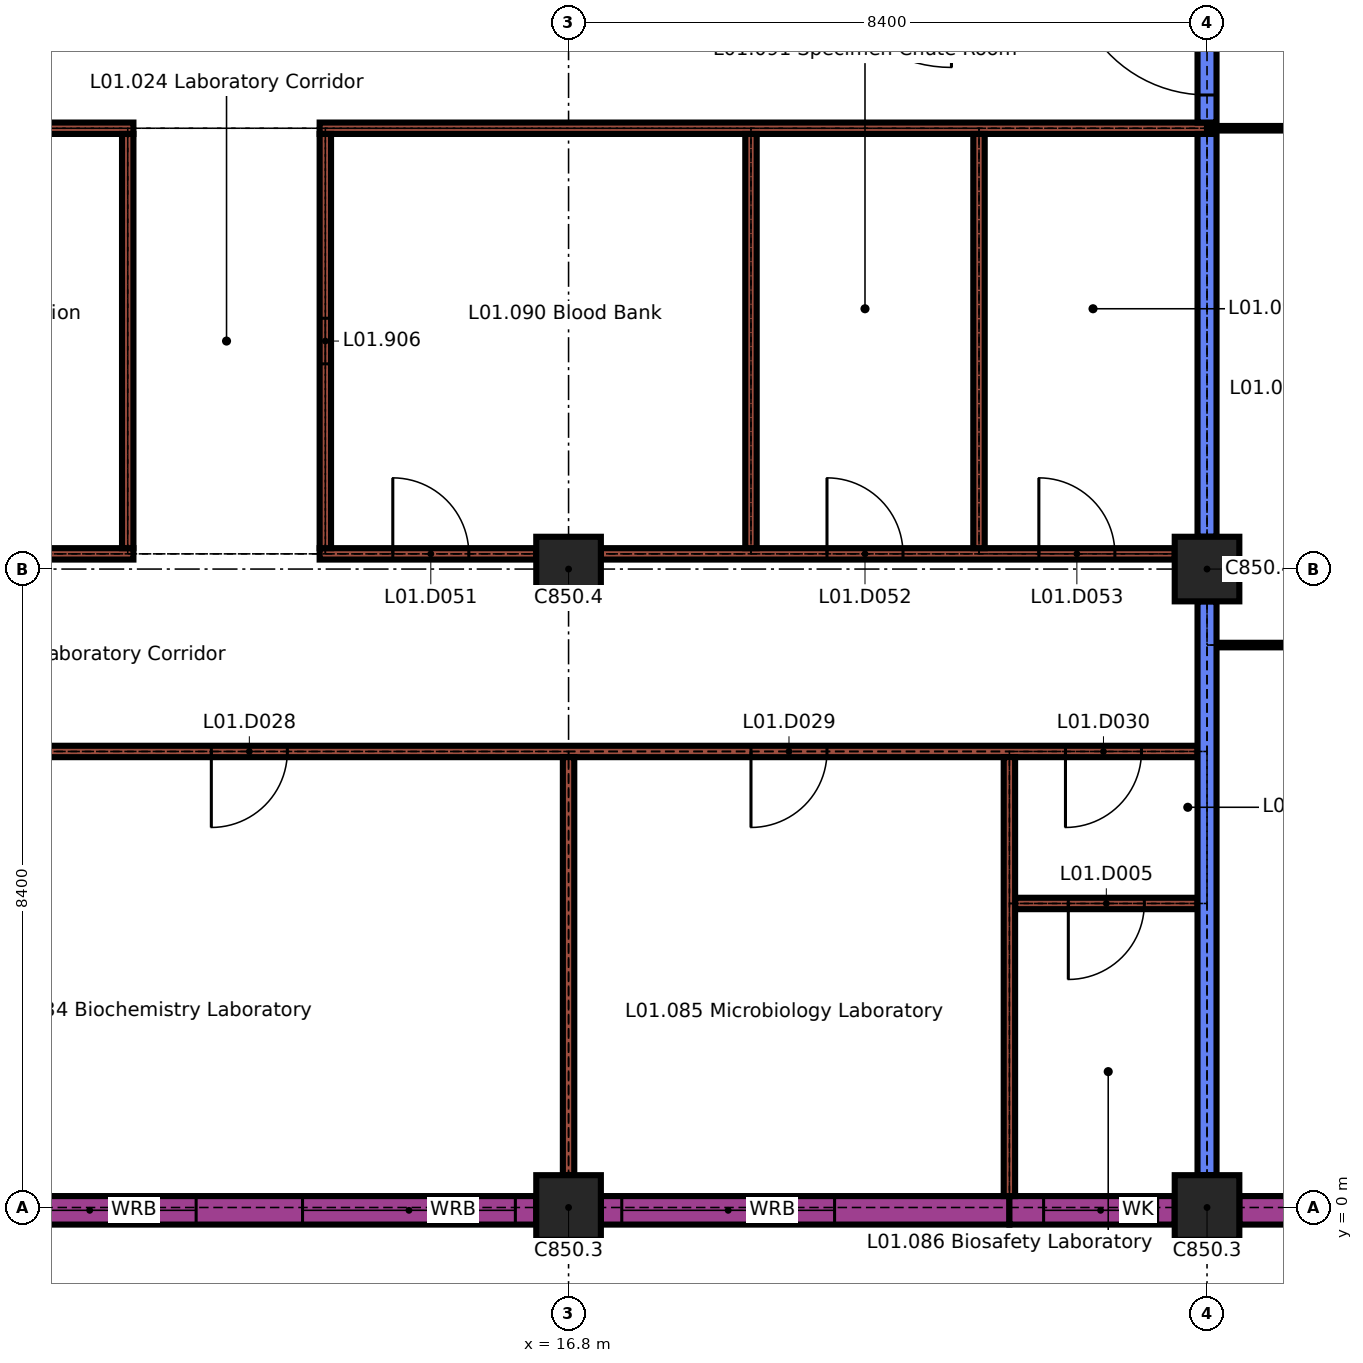
"""IFC4 building model, lengths in metres.
Left out: names, types, materials, properties, quantities, classifications, styles, units other than length and angle.
Written with IfcOpenShell. Run it as: python <this file> out.ifc"""

import sys

from ifc_helpers import new_model, si_unit, direction, frame, frame_2d, origin, origin_2d, place, context, subcontext, project, spatial, rectangle, extrude, element, fill, save


model = new_model("IFC4")
c1 = context("Model", 3, precision=1e-05, world=origin(), true_north=direction((0.0, 1.0)))
c2 = subcontext(c1, "Body", "Model", "MODEL_VIEW")
j1 = project(units=[si_unit("LENGTHUNIT", "METRE"), si_unit("PLANEANGLEUNIT", "RADIAN")], contexts=[c1])
p1 = place(None, origin())
s1 = spatial("IfcSite", under=j1, at=p1, CompositionType="ELEMENT")
p2 = place(p1, origin())
s2 = spatial("IfcBuilding", under=s1, at=p2, CompositionType="ELEMENT")
p3 = place(p2, frame((0.0, 0.0, 4.5)))
s3 = spatial("IfcBuildingStorey", under=s2, at=p3, CompositionType="ELEMENT", Elevation=4.5)
for number, where, z_axis, x_axis in (
    (1, (16.8, 0.0, 0.0), (0.0, 0.0, 1.0), (1.0, 0.0, 0.0)),
    (2, (25.2, 0.0, 0.0), (0.0, 0.0, 1.0), (1.0, 0.0, 0.0)),
    (3, (16.8, 8.4, 0.0), (0.0, 0.0, 1.0), (1.0, 0.0, 0.0)),
    (4, (25.2, 8.4, 0.0), (0.0, 0.0, 1.0), (1.0, 0.0, 0.0)),
):
    element("IfcColumn", number, at=place(p3, frame(where, z_axis=z_axis, x_axis=x_axis)), inside=s3, PredefinedType="COLUMN", context=c2, shape_type="SweptSolid", body=[
        extrude(rectangle(XDim=0.85, YDim=0.85, at=origin_2d()), origin(), (0.0, 0.0, 1.0), 3.45),
    ])
p4 = place(p3, frame((8.825, -0.038, 0.0), z_axis=(0.0, 0.0, 1.0), x_axis=(1.0, 0.0, 0.0)))
e5 = element("IfcWall", 5, at=p4, inside=s3, PredefinedType="SOLIDWALL", context=c2, shape_type="SweptSolid", body=[
    extrude(rectangle(XDim=7.55, YDim=0.375, at=frame_2d((3.775, 0.0))), origin(), (0.0, 0.0, 1.0), 3.15),
])
p5 = place(p4, frame((0.275, 0.0, 1.0)))
e6 = element("IfcOpeningElement", 6, at=p5, cuts=e5, PredefinedType="OPENING", context=c2, shape_type="SweptSolid", body=[
    extrude(rectangle(XDim=2.8, YDim=1.2, at=frame_2d((1.4, 0.6))), frame((0.0, 0.198, 0.0), z_axis=(0.0, -1.0, 0.0), x_axis=(1.0, 0.0, 0.0)), (0.0, 0.0, 1.0), 0.395),
])
p6 = place(p4, frame((4.475, 0.0, 1.0)))
e7 = element("IfcOpeningElement", 7, at=p6, cuts=e5, PredefinedType="OPENING", context=c2, shape_type="SweptSolid", body=[
    extrude(rectangle(XDim=2.8, YDim=1.2, at=frame_2d((1.4, 0.6))), frame((0.0, 0.198, 0.0), z_axis=(0.0, -1.0, 0.0), x_axis=(1.0, 0.0, 0.0)), (0.0, 0.0, 1.0), 0.395),
])
p7 = place(p3, frame((17.225, -0.038, 0.0), z_axis=(0.0, 0.0, 1.0), x_axis=(1.0, 0.0, 0.0)))
e8 = element("IfcWall", 8, at=p7, inside=s3, PredefinedType="SOLIDWALL", context=c2, shape_type="SweptSolid", body=[
    extrude(rectangle(XDim=5.375, YDim=0.375, at=frame_2d((2.688, 0.0))), origin(), (0.0, 0.0, 1.0), 3.15),
])
p8 = place(p7, frame((0.275, 0.0, 1.0)))
e9 = element("IfcOpeningElement", 9, at=p8, cuts=e8, PredefinedType="OPENING", context=c2, shape_type="SweptSolid", body=[
    extrude(rectangle(XDim=2.8, YDim=1.2, at=frame_2d((1.4, 0.6))), frame((0.0, 0.198, 0.0), z_axis=(0.0, -1.0, 0.0), x_axis=(1.0, 0.0, 0.0)), (0.0, 0.0, 1.0), 0.395),
])
p9 = place(p3, frame((22.6, -0.038, 0.0), z_axis=(0.0, 0.0, 1.0), x_axis=(1.0, 0.0, 0.0)))
e10 = element("IfcWall", 10, at=p9, inside=s3, PredefinedType="SOLIDWALL", context=c2, shape_type="SweptSolid", body=[
    extrude(rectangle(XDim=2.175, YDim=0.375, at=frame_2d((1.087, 0.0))), origin(), (0.0, 0.0, 1.0), 3.15),
])
p10 = place(p9, frame((0.45, 0.0, 1.05)))
e11 = element("IfcOpeningElement", 11, at=p10, cuts=e10, PredefinedType="OPENING", context=c2, shape_type="SweptSolid", body=[
    extrude(rectangle(XDim=1.5, YDim=1.2, at=frame_2d((0.75, 0.6))), frame((0.0, 0.198, 0.0), z_axis=(0.0, -1.0, 0.0), x_axis=(1.0, 0.0, 0.0)), (0.0, 0.0, 1.0), 0.395),
])
p11 = place(p3, frame((25.625, -0.038, 0.0), z_axis=(0.0, 0.0, 1.0), x_axis=(1.0, 0.0, 0.0)))
e12 = element("IfcWall", 12, at=p11, inside=s3, PredefinedType="SOLIDWALL", context=c2, shape_type="SweptSolid", body=[
    extrude(rectangle(XDim=7.975, YDim=0.375, at=frame_2d((3.988, 0.0))), origin(), (0.0, 0.0, 1.0), 3.15),
])
p12 = place(p3, frame((22.675, 4.0, 0.0), z_axis=(0.0, 0.0, 1.0), x_axis=(1.0, 0.0, 0.0)))
e13 = element("IfcWall", 13, at=p12, inside=s3, PredefinedType="PARTITIONING", context=c2, shape_type="SweptSolid", body=[
    extrude(rectangle(XDim=2.4, YDim=0.15, at=frame_2d((1.2, 0.0))), origin(), (0.0, 0.0, 1.0), 3.45),
])
p13 = place(p12, frame((0.7, 0.0, 0.0)))
e14 = element("IfcOpeningElement", 14, at=p13, cuts=e13, PredefinedType="OPENING", context=c2, shape_type="SweptSolid", body=[
    extrude(rectangle(XDim=1.0, YDim=2.1, at=frame_2d((0.5, 1.05))), frame((0.0, 0.085, 0.0), z_axis=(0.0, -1.0, 0.0), x_axis=(1.0, 0.0, 0.0)), (0.0, 0.0, 1.0), 0.17),
])
p14 = place(p3, frame((0.15, 6.0, 0.0), z_axis=(0.0, 0.0, 1.0), x_axis=(1.0, 0.0, 0.0)))
e15 = element("IfcWall", 15, at=p14, inside=s3, PredefinedType="PARTITIONING", context=c2, shape_type="SweptSolid", body=[
    extrude(rectangle(XDim=24.925, YDim=0.15, at=frame_2d((12.462, 0.0))), origin(), (0.0, 0.0, 1.0), 3.45),
])
p15 = place(p14, frame((3.625, 0.0, 0.0)))
e16 = element("IfcOpeningElement", 16, at=p15, cuts=e15, PredefinedType="OPENING", context=c2, shape_type="SweptSolid", body=[
    extrude(rectangle(XDim=1.0, YDim=2.1, at=frame_2d((0.5, 1.05))), frame((0.0, 0.085, 0.0), z_axis=(0.0, -1.0, 0.0), x_axis=(1.0, 0.0, 0.0)), (0.0, 0.0, 1.0), 0.17),
])
p16 = place(p14, frame((11.95, 0.0, 0.0)))
e17 = element("IfcOpeningElement", 17, at=p16, cuts=e15, PredefinedType="OPENING", context=c2, shape_type="SweptSolid", body=[
    extrude(rectangle(XDim=1.0, YDim=2.1, at=frame_2d((0.5, 1.05))), frame((0.0, 0.085, 0.0), z_axis=(0.0, -1.0, 0.0), x_axis=(1.0, 0.0, 0.0)), (0.0, 0.0, 1.0), 0.17),
])
p17 = place(p14, frame((19.05, 0.0, 0.0)))
e18 = element("IfcOpeningElement", 18, at=p17, cuts=e15, PredefinedType="OPENING", context=c2, shape_type="SweptSolid", body=[
    extrude(rectangle(XDim=1.0, YDim=2.1, at=frame_2d((0.5, 1.05))), frame((0.0, 0.085, 0.0), z_axis=(0.0, -1.0, 0.0), x_axis=(1.0, 0.0, 0.0)), (0.0, 0.0, 1.0), 0.17),
])
p18 = place(p14, frame((23.188, 0.0, 0.0)))
e19 = element("IfcOpeningElement", 19, at=p18, cuts=e15, PredefinedType="OPENING", context=c2, shape_type="SweptSolid", body=[
    extrude(rectangle(XDim=1.0, YDim=2.1, at=frame_2d((0.5, 1.05))), frame((0.0, 0.085, 0.0), z_axis=(0.0, -1.0, 0.0), x_axis=(1.0, 0.0, 0.0)), (0.0, 0.0, 1.0), 0.17),
])
p19 = place(p3, frame((25.325, 7.4, 0.0), z_axis=(0.0, 0.0, 1.0), x_axis=(1.0, 0.0, 0.0)))
e20 = element("IfcWall", 20, at=p19, inside=s3, PredefinedType="PARTITIONING", context=c2, shape_type="SweptSolid", body=[
    extrude(rectangle(XDim=8.175, YDim=0.06, at=frame_2d((4.087, 0.0))), origin(), (0.0, 0.0, 1.0), 3.45),
])
p20 = place(p19, frame((3.587, 0.0, 0.0)))
e21 = element("IfcOpeningElement", 21, at=p20, cuts=e20, PredefinedType="OPENING", context=c2, shape_type="SweptSolid", body=[
    extrude(rectangle(XDim=1.0, YDim=2.1, at=frame_2d((0.5, 1.05))), frame((0.0, 0.04, 0.0), z_axis=(0.0, -1.0, 0.0), x_axis=(1.0, 0.0, 0.0)), (0.0, 0.0, 1.0), 0.08),
])
p21 = place(p3, frame((8.825, 8.6, 0.0), z_axis=(0.0, 0.0, 1.0), x_axis=(1.0, 0.0, 0.0)))
e22 = element("IfcWall", 22, at=p21, inside=s3, PredefinedType="PARTITIONING", context=c2, shape_type="SweptSolid", body=[
    extrude(rectangle(XDim=2.25, YDim=0.15, at=frame_2d((1.125, 0.0))), origin(), (0.0, 0.0, 1.0), 3.45),
])
p22 = place(p3, frame((13.525, 8.6, 0.0), z_axis=(0.0, 0.0, 1.0), x_axis=(1.0, 0.0, 0.0)))
e23 = element("IfcWall", 23, at=p22, inside=s3, PredefinedType="PARTITIONING", context=c2, shape_type="SweptSolid", body=[
    extrude(rectangle(XDim=2.85, YDim=0.15, at=frame_2d((1.425, 0.0))), origin(), (0.0, 0.0, 1.0), 3.45),
])
p23 = place(p22, frame((0.962, 0.0, 0.0)))
e24 = element("IfcOpeningElement", 24, at=p23, cuts=e23, PredefinedType="OPENING", context=c2, shape_type="SweptSolid", body=[
    extrude(rectangle(XDim=1.0, YDim=2.1, at=frame_2d((0.5, 1.05))), frame((0.0, 0.085, 0.0), z_axis=(0.0, -1.0, 0.0), x_axis=(1.0, 0.0, 0.0)), (0.0, 0.0, 1.0), 0.17),
])
p24 = place(p3, frame((17.225, 8.6, 0.0), z_axis=(0.0, 0.0, 1.0), x_axis=(1.0, 0.0, 0.0)))
e25 = element("IfcWall", 25, at=p24, inside=s3, PredefinedType="PARTITIONING", context=c2, shape_type="SweptSolid", body=[
    extrude(rectangle(XDim=7.55, YDim=0.15, at=frame_2d((3.775, 0.0))), origin(), (0.0, 0.0, 1.0), 3.45),
])
p25 = place(p24, frame((2.975, 0.0, 0.0)))
e26 = element("IfcOpeningElement", 26, at=p25, cuts=e25, PredefinedType="OPENING", context=c2, shape_type="SweptSolid", body=[
    extrude(rectangle(XDim=1.0, YDim=2.1, at=frame_2d((0.5, 1.05))), frame((0.0, 0.085, 0.0), z_axis=(0.0, -1.0, 0.0), x_axis=(1.0, 0.0, 0.0)), (0.0, 0.0, 1.0), 0.17),
])
p26 = place(p24, frame((5.762, 0.0, 0.0)))
e27 = element("IfcOpeningElement", 27, at=p26, cuts=e25, PredefinedType="OPENING", context=c2, shape_type="SweptSolid", body=[
    extrude(rectangle(XDim=1.0, YDim=2.1, at=frame_2d((0.5, 1.05))), frame((0.0, 0.085, 0.0), z_axis=(0.0, -1.0, 0.0), x_axis=(1.0, 0.0, 0.0)), (0.0, 0.0, 1.0), 0.17),
])
p27 = place(p3, frame((0.15, 14.2, 0.0), z_axis=(0.0, 0.0, 1.0), x_axis=(1.0, 0.0, 0.0)))
e28 = element("IfcWall", 28, at=p27, inside=s3, PredefinedType="PARTITIONING", context=c2, shape_type="SweptSolid", body=[
    extrude(rectangle(XDim=10.925, YDim=0.15, at=frame_2d((5.462, 0.0))), origin(), (0.0, 0.0, 1.0), 3.45),
])
p28 = place(p27, frame((2.025, 0.0, 0.0)))
e29 = element("IfcOpeningElement", 29, at=p28, cuts=e28, PredefinedType="OPENING", context=c2, shape_type="SweptSolid", body=[
    extrude(rectangle(XDim=1.4, YDim=2.1, at=frame_2d((0.7, 1.05))), frame((0.0, 0.085, 0.0), z_axis=(0.0, -1.0, 0.0), x_axis=(1.0, 0.0, 0.0)), (0.0, 0.0, 1.0), 0.17),
])
p29 = place(p27, frame((0.2, 0.0, 0.9)))
e30 = element("IfcOpeningElement", 30, at=p29, cuts=e28, PredefinedType="OPENING", context=c2, shape_type="SweptSolid", body=[
    extrude(rectangle(XDim=1.5, YDim=1.0, at=frame_2d((0.75, 0.5))), frame((0.0, 0.085, 0.0), z_axis=(0.0, -1.0, 0.0), x_axis=(1.0, 0.0, 0.0)), (0.0, 0.0, 1.0), 0.17),
])
p30 = place(p3, frame((13.525, 14.2, 0.0), z_axis=(0.0, 0.0, 1.0), x_axis=(1.0, 0.0, 0.0)))
e31 = element("IfcWall", 31, at=p30, inside=s3, PredefinedType="PARTITIONING", context=c2, shape_type="SweptSolid", body=[
    extrude(rectangle(XDim=11.675, YDim=0.15, at=frame_2d((5.837, 0.0))), origin(), (0.0, 0.0, 1.0), 3.45),
])
p31 = place(p3, frame((25.2, 14.2, 0.0), z_axis=(0.0, 0.0, 1.0), x_axis=(1.0, 0.0, 0.0)))
e32 = element("IfcWall", 32, at=p31, inside=s3, PredefinedType="PARTITIONING", context=c2, shape_type="SweptSolid", body=[
    extrude(rectangle(XDim=8.4, YDim=0.06, at=frame_2d((4.2, 0.0))), origin(), (0.0, 0.0, 1.0), 3.45),
])
p32 = place(p31, frame((3.5, 0.0, 0.0)))
e33 = element("IfcOpeningElement", 33, at=p32, cuts=e32, PredefinedType="OPENING", context=c2, shape_type="SweptSolid", body=[
    extrude(rectangle(XDim=1.4, YDim=2.1, at=frame_2d((0.7, 1.05))), frame((0.0, 0.04, 0.0), z_axis=(0.0, -1.0, 0.0), x_axis=(1.0, 0.0, 0.0)), (0.0, 0.0, 1.0), 0.08),
])
p33 = place(p31, frame((1.4, 0.0, 0.9)))
e34 = element("IfcOpeningElement", 34, at=p33, cuts=e32, PredefinedType="OPENING", context=c2, shape_type="SweptSolid", body=[
    extrude(rectangle(XDim=1.8, YDim=1.0, at=frame_2d((0.9, 0.5))), frame((0.0, 0.04, 0.0), z_axis=(0.0, -1.0, 0.0), x_axis=(1.0, 0.0, 0.0)), (0.0, 0.0, 1.0), 0.08),
])
p34 = place(p3, frame((11.0, 8.675, 0.0), z_axis=(0.0, 0.0, 1.0), x_axis=(0.0, 1.0, 0.0)))
e35 = element("IfcWall", 35, at=p34, inside=s3, PredefinedType="PARTITIONING", context=c2, shape_type="SweptSolid", body=[
    extrude(rectangle(XDim=5.45, YDim=0.15, at=frame_2d((2.725, 0.0))), origin(), (0.0, 0.0, 1.0), 3.45),
])
p35 = place(p3, frame((13.6, 8.675, 0.0), z_axis=(0.0, 0.0, 1.0), x_axis=(0.0, 1.0, 0.0)))
e36 = element("IfcWall", 36, at=p35, inside=s3, PredefinedType="PARTITIONING", context=c2, shape_type="SweptSolid", body=[
    extrude(rectangle(XDim=5.45, YDim=0.15, at=frame_2d((2.725, 0.0))), origin(), (0.0, 0.0, 1.0), 3.45),
])
p36 = place(p35, frame((2.425, 0.0, 0.9)))
e37 = element("IfcOpeningElement", 37, at=p36, cuts=e36, PredefinedType="OPENING", context=c2, shape_type="SweptSolid", body=[
    extrude(rectangle(XDim=0.6, YDim=0.6, at=frame_2d((0.3, 0.3))), frame((0.0, 0.085, 0.0), z_axis=(0.0, -1.0, 0.0), x_axis=(1.0, 0.0, 0.0)), (0.0, 0.0, 1.0), 0.17),
])
p37 = place(p3, frame((16.8, 0.425, 0.0), z_axis=(0.0, 0.0, 1.0), x_axis=(0.0, 1.0, 0.0)))
e38 = element("IfcWall", 38, at=p37, inside=s3, PredefinedType="PARTITIONING", context=c2, shape_type="SweptSolid", body=[
    extrude(rectangle(XDim=5.5, YDim=0.15, at=frame_2d((2.75, 0.0))), origin(), (0.0, 0.0, 1.0), 3.45),
])
for number, where, z_axis, x_axis in (
    (39, (19.2, 8.675, 0.0), (0.0, 0.0, 1.0), (0.0, 1.0, 0.0)),
    (40, (22.2, 8.675, 0.0), (0.0, 0.0, 1.0), (0.0, 1.0, 0.0)),
):
    element("IfcWall", number, at=place(p3, frame(where, z_axis=z_axis, x_axis=x_axis)), inside=s3, PredefinedType="PARTITIONING", context=c2, shape_type="SweptSolid", body=[
        extrude(rectangle(XDim=5.45, YDim=0.15, at=frame_2d((2.725, 0.0))), origin(), (0.0, 0.0, 1.0), 3.45),
    ])
p38 = place(p3, frame((22.6, 0.15, 0.0), z_axis=(0.0, 0.0, 1.0), x_axis=(0.0, 1.0, 0.0)))
e41 = element("IfcWall", 41, at=p38, inside=s3, PredefinedType="PARTITIONING", context=c2, shape_type="SweptSolid", body=[
    extrude(rectangle(XDim=5.775, YDim=0.15, at=frame_2d((2.888, 0.0))), origin(), (0.0, 0.0, 1.0), 3.45),
])
p39 = place(p3, frame((25.2, 0.425, 0.0), z_axis=(0.0, 0.0, 1.0), x_axis=(0.0, 1.0, 0.0)))
e42 = element("IfcWall", 42, at=p39, inside=s3, PredefinedType="SOLIDWALL", context=c2, shape_type="SweptSolid", body=[
    extrude(rectangle(XDim=7.55, YDim=0.25, at=frame_2d((3.775, 0.0))), origin(), (0.0, 0.0, 1.0), 3.45),
])
p40 = place(p3, frame((25.2, 8.825, 0.0), z_axis=(0.0, 0.0, 1.0), x_axis=(0.0, 1.0, 0.0)))
e43 = element("IfcWall", 43, at=p40, inside=s3, PredefinedType="SOLIDWALL", context=c2, shape_type="SweptSolid", body=[
    extrude(rectangle(XDim=5.3, YDim=0.25, at=frame_2d((2.65, 0.0))), origin(), (0.0, 0.0, 1.0), 3.45),
])
p41 = place(p3, frame((25.2, 14.275, 0.0), z_axis=(0.0, 0.0, 1.0), x_axis=(0.0, 1.0, 0.0)))
e44 = element("IfcWall", 44, at=p41, inside=s3, PredefinedType="SOLIDWALL", context=c2, shape_type="SweptSolid", body=[
    extrude(rectangle(XDim=7.325, YDim=0.25, at=frame_2d((3.663, 0.0))), origin(), (0.0, 0.0, 1.0), 3.45),
])
p42 = place(p41, frame((0.363, 0.0, 0.0)))
e45 = element("IfcOpeningElement", 45, at=p42, cuts=e44, PredefinedType="OPENING", context=c2, shape_type="SweptSolid", body=[
    extrude(rectangle(XDim=1.8, YDim=2.4, at=frame_2d((0.9, 1.2))), frame((0.0, 0.135, 0.0), z_axis=(0.0, -1.0, 0.0), x_axis=(1.0, 0.0, 0.0)), (0.0, 0.0, 1.0), 0.27),
])
p43 = place(p41, frame((4.025, 0.0, 0.0)))
e46 = element("IfcOpeningElement", 46, at=p43, cuts=e44, PredefinedType="OPENING", context=c2, shape_type="SweptSolid", body=[
    extrude(rectangle(XDim=1.8, YDim=2.4, at=frame_2d((0.9, 1.2))), frame((0.0, 0.135, 0.0), z_axis=(0.0, -1.0, 0.0), x_axis=(1.0, 0.0, 0.0)), (0.0, 0.0, 1.0), 0.27),
])
p44 = place(p5, origin())
e47 = element("IfcWindow", 47, at=p44, inside=s3, PartitioningType="DOUBLE_PANEL_VERTICAL", PredefinedType="WINDOW", context=c2, shape_type="SweptSolid", body=[
    extrude(rectangle(XDim=2.8, YDim=1.2, at=frame_2d((1.4, 0.6))), frame((0.0, 0.03, 0.0), z_axis=(0.0, -1.0, 0.0), x_axis=(1.0, 0.0, 0.0)), (0.0, 0.0, 1.0), 0.06),
])
fill(e6, e47)
p45 = place(p6, origin())
e48 = element("IfcWindow", 48, at=p45, inside=s3, PartitioningType="DOUBLE_PANEL_VERTICAL", PredefinedType="WINDOW", context=c2, shape_type="SweptSolid", body=[
    extrude(rectangle(XDim=2.8, YDim=1.2, at=frame_2d((1.4, 0.6))), frame((0.0, 0.03, 0.0), z_axis=(0.0, -1.0, 0.0), x_axis=(1.0, 0.0, 0.0)), (0.0, 0.0, 1.0), 0.06),
])
fill(e7, e48)
p46 = place(p8, origin())
e49 = element("IfcWindow", 49, at=p46, inside=s3, PartitioningType="DOUBLE_PANEL_VERTICAL", PredefinedType="WINDOW", context=c2, shape_type="SweptSolid", body=[
    extrude(rectangle(XDim=2.8, YDim=1.2, at=frame_2d((1.4, 0.6))), frame((0.0, 0.03, 0.0), z_axis=(0.0, -1.0, 0.0), x_axis=(1.0, 0.0, 0.0)), (0.0, 0.0, 1.0), 0.06),
])
fill(e9, e49)
p47 = place(p10, origin())
e50 = element("IfcWindow", 50, at=p47, inside=s3, PartitioningType="SINGLE_PANEL", PredefinedType="WINDOW", context=c2, shape_type="SweptSolid", body=[
    extrude(rectangle(XDim=1.5, YDim=1.2, at=frame_2d((0.75, 0.6))), frame((0.0, 0.03, 0.0), z_axis=(0.0, -1.0, 0.0), x_axis=(1.0, 0.0, 0.0)), (0.0, 0.0, 1.0), 0.06),
])
fill(e11, e50)
p48 = place(p13, origin())
e51 = element("IfcDoor", 51, at=p48, inside=s3, OperationType="SINGLE_SWING_LEFT", PredefinedType="DOOR", context=c2, shape_type="SweptSolid", body=[
    extrude(rectangle(XDim=1.0, YDim=2.1, at=frame_2d((0.5, 1.05))), frame((0.0, 0.05, 0.0), z_axis=(0.0, -1.0, 0.0), x_axis=(1.0, 0.0, 0.0)), (0.0, 0.0, 1.0), 0.1),
])
fill(e14, e51)
p49 = place(p16, origin())
e52 = element("IfcDoor", 52, at=p49, inside=s3, OperationType="SINGLE_SWING_LEFT", PredefinedType="DOOR", context=c2, shape_type="SweptSolid", body=[
    extrude(rectangle(XDim=1.0, YDim=2.1, at=frame_2d((0.5, 1.05))), frame((0.0, 0.025, 0.0), z_axis=(0.0, -1.0, 0.0), x_axis=(1.0, 0.0, 0.0)), (0.0, 0.0, 1.0), 0.05),
])
fill(e17, e52)
p50 = place(p17, origin())
e53 = element("IfcDoor", 53, at=p50, inside=s3, OperationType="SINGLE_SWING_LEFT", PredefinedType="DOOR", context=c2, shape_type="SweptSolid", body=[
    extrude(rectangle(XDim=1.0, YDim=2.1, at=frame_2d((0.5, 1.05))), frame((0.0, 0.025, 0.0), z_axis=(0.0, -1.0, 0.0), x_axis=(1.0, 0.0, 0.0)), (0.0, 0.0, 1.0), 0.05),
])
fill(e18, e53)
p51 = place(p18, origin())
e54 = element("IfcDoor", 54, at=p51, inside=s3, OperationType="SINGLE_SWING_LEFT", PredefinedType="DOOR", context=c2, shape_type="SweptSolid", body=[
    extrude(rectangle(XDim=1.0, YDim=2.1, at=frame_2d((0.5, 1.05))), frame((0.0, 0.05, 0.0), z_axis=(0.0, -1.0, 0.0), x_axis=(1.0, 0.0, 0.0)), (0.0, 0.0, 1.0), 0.1),
])
fill(e19, e54)
p52 = place(p23, origin())
e55 = element("IfcDoor", 55, at=p52, inside=s3, OperationType="SINGLE_SWING_RIGHT", PredefinedType="DOOR", context=c2, shape_type="SweptSolid", body=[
    extrude(rectangle(XDim=1.0, YDim=2.1, at=frame_2d((0.5, 1.05))), frame((0.0, 0.025, 0.0), z_axis=(0.0, -1.0, 0.0), x_axis=(1.0, 0.0, 0.0)), (0.0, 0.0, 1.0), 0.05),
])
fill(e24, e55)
p53 = place(p25, origin())
e56 = element("IfcDoor", 56, at=p53, inside=s3, OperationType="SINGLE_SWING_RIGHT", PredefinedType="DOOR", context=c2, shape_type="SweptSolid", body=[
    extrude(rectangle(XDim=1.0, YDim=2.1, at=frame_2d((0.5, 1.05))), frame((0.0, 0.025, 0.0), z_axis=(0.0, -1.0, 0.0), x_axis=(1.0, 0.0, 0.0)), (0.0, 0.0, 1.0), 0.05),
])
fill(e26, e56)
p54 = place(p26, origin())
e57 = element("IfcDoor", 57, at=p54, inside=s3, OperationType="SINGLE_SWING_RIGHT", PredefinedType="DOOR", context=c2, shape_type="SweptSolid", body=[
    extrude(rectangle(XDim=1.0, YDim=2.1, at=frame_2d((0.5, 1.05))), frame((0.0, 0.025, 0.0), z_axis=(0.0, -1.0, 0.0), x_axis=(1.0, 0.0, 0.0)), (0.0, 0.0, 1.0), 0.05),
])
fill(e27, e57)
p55 = place(p42, origin())
e58 = element("IfcDoor", 58, at=p55, inside=s3, OperationType="SINGLE_SWING_LEFT", PredefinedType="DOOR", context=c2, shape_type="SweptSolid", body=[
    extrude(rectangle(XDim=1.8, YDim=2.4, at=frame_2d((0.9, 1.2))), frame((0.0, 0.03, 0.0), z_axis=(0.0, -1.0, 0.0), x_axis=(1.0, 0.0, 0.0)), (0.0, 0.0, 1.0), 0.06),
])
fill(e45, e58)
p56 = place(p36, origin())
e59 = element("IfcWindow", 59, at=p56, inside=s3, PartitioningType="SINGLE_PANEL", PredefinedType="WINDOW", context=c2, shape_type="SweptSolid", body=[
    extrude(rectangle(XDim=0.6, YDim=0.6, at=frame_2d((0.3, 0.3))), frame((0.0, 0.04, 0.0), z_axis=(0.0, -1.0, 0.0), x_axis=(1.0, 0.0, 0.0)), (0.0, 0.0, 1.0), 0.08),
])
fill(e37, e59)
save(model, sys.argv[1])
